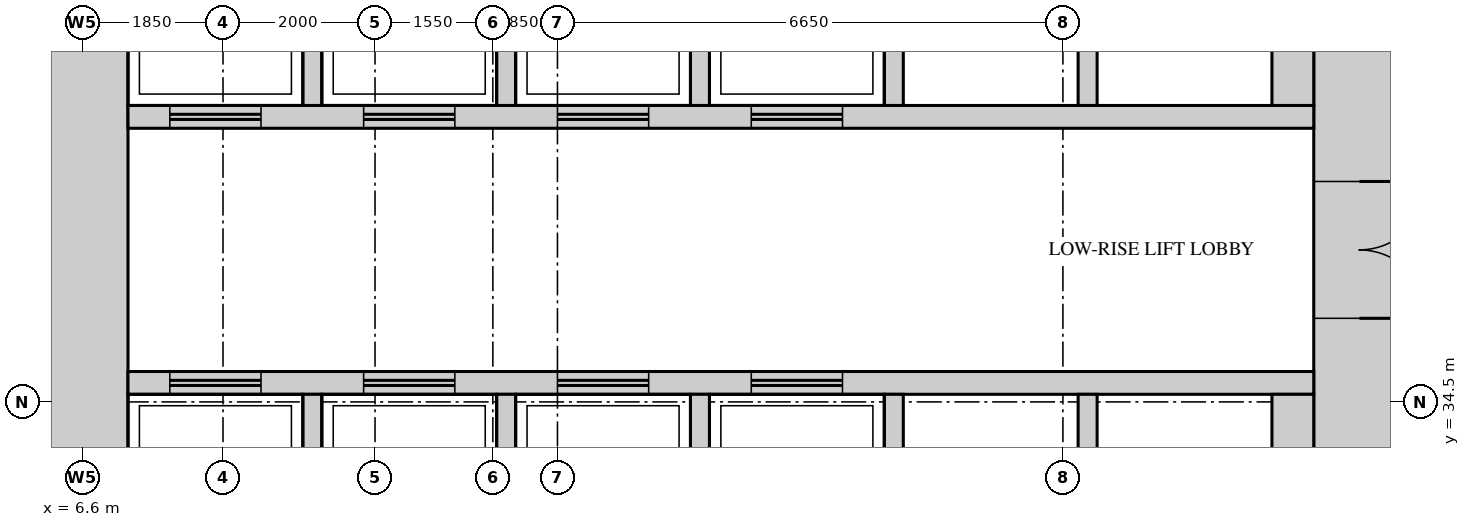
"""IFC4 building model, lengths in metres.
Left out: names, types, materials, properties, quantities, classifications, styles, units other than length and angle.
Written with IfcOpenShell. Run it as: python <this file> out.ifc"""

import sys

from ifc_helpers import new_model, si_unit, direction, frame, frame_2d, origin, place, context, subcontext, project, spatial, rectangle, extrude, source, transform, mapped, element, fill, save


model = new_model("IFC4")
c1 = context("Model", 3, precision=1e-05, world=origin(), true_north=direction((0.0, 1.0)))
c2 = subcontext(c1, "Body", "Model", "MODEL_VIEW")
j1 = project(units=[si_unit("LENGTHUNIT", "METRE"), si_unit("PLANEANGLEUNIT", "RADIAN")], contexts=[c1])
p1 = place(None, origin())
s1 = spatial("IfcSite", under=j1, at=p1, CompositionType="ELEMENT")
p2 = place(p1, origin())
s2 = spatial("IfcBuilding", under=s1, at=p2, CompositionType="ELEMENT")
p3 = place(p2, frame((0.0, 0.0, 91.5)))
s3 = spatial("IfcBuildingStorey", under=s2, at=p3, CompositionType="ELEMENT", Elevation=91.5)
m1 = source(origin(), c2, "Body", "SweptSolid", [
    extrude(rectangle(XDim=27.6, YDim=1.2, at=frame_2d((13.8, 0.0))), origin(), (0.0, 0.0, 1.0), 4.2),
])
p4 = place(p3, frame((23.4, 13.2, 0.0), z_axis=(0.0, 0.0, 1.0), x_axis=(0.0, 1.0, 0.0)))
e1 = element("IfcWall", 1, at=p4, inside=s3, PredefinedType="SHEAR", context=c2, shape_type="MappedRepresentation", body=[
    mapped(m1, transform((0.0, 0.0, 0.0))),
])
m2 = source(origin(), c2, "Body", "SweptSolid", [
    extrude(rectangle(XDim=1.8, YDim=2.1, at=frame_2d((0.9, 1.05))), frame((0.0, 0.61, 0.0), z_axis=(0.0, -1.0, 0.0), x_axis=(1.0, 0.0, 0.0)), (0.0, 0.0, 1.0), 1.22),
])
p5 = place(p4, frame((22.4, 0.0, 0.0)))
e2 = element("IfcOpeningElement", 2, at=p5, cuts=e1, PredefinedType="OPENING", context=c2, shape_type="MappedRepresentation", body=[
    mapped(m2, transform((0.0, 0.0, 0.0))),
])
m3 = source(origin(), c2, "Body", "SweptSolid", [
    extrude(rectangle(XDim=1.2, YDim=2.1, at=frame_2d((0.6, 1.05))), frame((0.0, 0.61, 0.0), z_axis=(0.0, -1.0, 0.0), x_axis=(1.0, 0.0, 0.0)), (0.0, 0.0, 1.0), 1.22),
])
p6 = place(p4, frame((12.9, 0.0, 0.0)))
e3 = element("IfcOpeningElement", 3, at=p6, cuts=e1, PredefinedType="OPENING", context=c2, shape_type="MappedRepresentation", body=[
    mapped(m3, transform((0.0, 0.0, 0.0))),
])
m4 = source(origin(), c2, "Body", "SweptSolid", [
    extrude(rectangle(XDim=0.9, YDim=2.1, at=frame_2d((0.45, 1.05))), frame((0.0, 0.61, 0.0), z_axis=(0.0, -1.0, 0.0), x_axis=(1.0, 0.0, 0.0)), (0.0, 0.0, 1.0), 1.22),
])
p7 = place(p4, frame((2.0, 0.0, 0.0)))
e4 = element("IfcOpeningElement", 4, at=p7, cuts=e1, PredefinedType="OPENING", context=c2, shape_type="MappedRepresentation", body=[
    mapped(m4, transform((0.0, 0.0, 0.0))),
])
p8 = place(p4, frame((6.85, 0.0, 0.0)))
e5 = element("IfcOpeningElement", 5, at=p8, cuts=e1, PredefinedType="OPENING", context=c2, shape_type="MappedRepresentation", body=[
    mapped(m4, transform((0.0, 0.0, 0.0))),
])
p9 = place(p3, frame((6.6, 13.2, 0.0), z_axis=(0.0, 0.0, 1.0), x_axis=(0.0, 1.0, 0.0)))
e6 = element("IfcWall", 6, at=p9, inside=s3, PredefinedType="SHEAR", context=c2, shape_type="MappedRepresentation", body=[
    mapped(m1, transform((0.0, 0.0, 0.0))),
])
m5 = source(origin(), c2, "Body", "SweptSolid", [
    extrude(rectangle(XDim=15.6, YDim=0.3, at=frame_2d((7.8, 0.0))), origin(), (0.0, 0.0, 1.0), 4.2),
])
p10 = place(p3, frame((7.2, 38.25, 0.0), z_axis=(0.0, 0.0, 1.0), x_axis=(1.0, 0.0, 0.0)))
e7 = element("IfcWall", 7, at=p10, inside=s3, PredefinedType="STANDARD", context=c2, shape_type="MappedRepresentation", body=[
    mapped(m5, transform((0.0, 0.0, 0.0))),
])
m6 = source(origin(), c2, "Body", "SweptSolid", [
    extrude(rectangle(XDim=1.2, YDim=2.1, at=frame_2d((0.6, 1.05))), frame((0.0, 0.16, 0.0), z_axis=(0.0, -1.0, 0.0), x_axis=(1.0, 0.0, 0.0)), (0.0, 0.0, 1.0), 0.32),
])
p11 = place(p10, frame((0.55, 0.0, 0.0)))
e8 = element("IfcOpeningElement", 8, at=p11, cuts=e7, PredefinedType="OPENING", context=c2, shape_type="MappedRepresentation", body=[
    mapped(m6, transform((0.0, 0.0, 0.0))),
])
p12 = place(p10, frame((3.1, 0.0, 0.0)))
e9 = element("IfcOpeningElement", 9, at=p12, cuts=e7, PredefinedType="OPENING", context=c2, shape_type="MappedRepresentation", body=[
    mapped(m6, transform((0.0, 0.0, 0.0))),
])
p13 = place(p10, frame((5.65, 0.0, 0.0)))
e10 = element("IfcOpeningElement", 10, at=p13, cuts=e7, PredefinedType="OPENING", context=c2, shape_type="MappedRepresentation", body=[
    mapped(m6, transform((0.0, 0.0, 0.0))),
])
p14 = place(p10, frame((8.2, 0.0, 0.0)))
e11 = element("IfcOpeningElement", 11, at=p14, cuts=e7, PredefinedType="OPENING", context=c2, shape_type="MappedRepresentation", body=[
    mapped(m6, transform((0.0, 0.0, 0.0))),
])
p15 = place(p3, frame((7.2, 34.75, 0.0), z_axis=(0.0, 0.0, 1.0), x_axis=(1.0, 0.0, 0.0)))
e12 = element("IfcWall", 12, at=p15, inside=s3, PredefinedType="STANDARD", context=c2, shape_type="MappedRepresentation", body=[
    mapped(m5, transform((0.0, 0.0, 0.0))),
])
p16 = place(p15, frame((0.55, 0.0, 0.0)))
e13 = element("IfcOpeningElement", 13, at=p16, cuts=e12, PredefinedType="OPENING", context=c2, shape_type="MappedRepresentation", body=[
    mapped(m6, transform((0.0, 0.0, 0.0))),
])
p17 = place(p15, frame((3.1, 0.0, 0.0)))
e14 = element("IfcOpeningElement", 14, at=p17, cuts=e12, PredefinedType="OPENING", context=c2, shape_type="MappedRepresentation", body=[
    mapped(m6, transform((0.0, 0.0, 0.0))),
])
p18 = place(p15, frame((5.65, 0.0, 0.0)))
e15 = element("IfcOpeningElement", 15, at=p18, cuts=e12, PredefinedType="OPENING", context=c2, shape_type="MappedRepresentation", body=[
    mapped(m6, transform((0.0, 0.0, 0.0))),
])
p19 = place(p15, frame((8.2, 0.0, 0.0)))
e16 = element("IfcOpeningElement", 16, at=p19, cuts=e12, PredefinedType="OPENING", context=c2, shape_type="MappedRepresentation", body=[
    mapped(m6, transform((0.0, 0.0, 0.0))),
])
m7 = source(origin(), c2, "Body", "SweptSolid", [
    extrude(rectangle(XDim=2.4, YDim=0.25, at=frame_2d((1.2, 0.0))), origin(), (0.0, 0.0, 1.0), 4.2),
])
for number, where, z_axis, x_axis in (
    (17, (9.625, 38.4, 0.0), (0.0, 0.0, 1.0), (0.0, 1.0, 0.0)),
    (18, (12.175, 38.4, 0.0), (0.0, 0.0, 1.0), (0.0, 1.0, 0.0)),
    (19, (14.725, 38.4, 0.0), (0.0, 0.0, 1.0), (0.0, 1.0, 0.0)),
    (20, (17.275, 38.4, 0.0), (0.0, 0.0, 1.0), (0.0, 1.0, 0.0)),
    (21, (19.825, 38.4, 0.0), (0.0, 0.0, 1.0), (0.0, 1.0, 0.0)),
):
    element("IfcWall", number, at=place(p3, frame(where, z_axis=z_axis, x_axis=x_axis)), inside=s3, PredefinedType="STANDARD", context=c2, shape_type="MappedRepresentation", body=[
        mapped(m7, transform((0.0, 0.0, 0.0))),
    ])
m8 = source(origin(), c2, "Body", "SweptSolid", [
    extrude(rectangle(XDim=2.4, YDim=0.55, at=frame_2d((1.2, 0.0))), origin(), (0.0, 0.0, 1.0), 4.2),
])
p20 = place(p3, frame((22.525, 38.4, 0.0), z_axis=(0.0, 0.0, 1.0), x_axis=(0.0, 1.0, 0.0)))
e22 = element("IfcWall", 22, at=p20, inside=s3, PredefinedType="STANDARD", context=c2, shape_type="MappedRepresentation", body=[
    mapped(m8, transform((0.0, 0.0, 0.0))),
])
for number, where, z_axis, x_axis in (
    (23, (9.625, 32.2, 0.0), (0.0, 0.0, 1.0), (0.0, 1.0, 0.0)),
    (24, (12.175, 32.2, 0.0), (0.0, 0.0, 1.0), (0.0, 1.0, 0.0)),
    (25, (14.725, 32.2, 0.0), (0.0, 0.0, 1.0), (0.0, 1.0, 0.0)),
    (26, (17.275, 32.2, 0.0), (0.0, 0.0, 1.0), (0.0, 1.0, 0.0)),
    (27, (19.825, 32.2, 0.0), (0.0, 0.0, 1.0), (0.0, 1.0, 0.0)),
):
    element("IfcWall", number, at=place(p3, frame(where, z_axis=z_axis, x_axis=x_axis)), inside=s3, PredefinedType="STANDARD", context=c2, shape_type="MappedRepresentation", body=[
        mapped(m7, transform((0.0, 0.0, 0.0))),
    ])
p21 = place(p3, frame((22.525, 32.2, 0.0), z_axis=(0.0, 0.0, 1.0), x_axis=(0.0, 1.0, 0.0)))
e28 = element("IfcWall", 28, at=p21, inside=s3, PredefinedType="STANDARD", context=c2, shape_type="MappedRepresentation", body=[
    mapped(m8, transform((0.0, 0.0, 0.0))),
])
m9 = source(origin(), c2, "Body", "SweptSolid", [
    extrude(rectangle(XDim=1.8, YDim=2.1, at=frame_2d((0.9, 1.05))), frame((0.0, 0.55, 0.0), z_axis=(0.0, -1.0, 0.0), x_axis=(1.0, 0.0, 0.0)), (0.0, 0.0, 1.0), 1.1),
])
p22 = place(p5, origin())
e29 = element("IfcDoor", 29, at=p22, inside=s3, OperationType="DOUBLE_DOOR_SINGLE_SWING", PredefinedType="DOOR", context=c2, shape_type="MappedRepresentation", body=[
    mapped(m9, transform((0.0, 0.0, 0.0))),
])
fill(e2, e29)
m10 = source(origin(), c2, "Body", "SweptSolid", [
    extrude(rectangle(XDim=1.2, YDim=2.1, at=frame_2d((0.6, 1.05))), frame((0.0, 0.025, 0.0), z_axis=(0.0, -1.0, 0.0), x_axis=(1.0, 0.0, 0.0)), (0.0, 0.0, 1.0), 0.05),
])
p23 = place(p16, origin())
e30 = element("IfcDoor", 30, at=p23, inside=s3, OperationType="DOUBLE_DOOR_SLIDING", PredefinedType="DOOR", context=c2, shape_type="MappedRepresentation", body=[
    mapped(m10, transform((0.0, 0.0, 0.0))),
])
fill(e13, e30)
p24 = place(p17, origin())
e31 = element("IfcDoor", 31, at=p24, inside=s3, OperationType="DOUBLE_DOOR_SLIDING", PredefinedType="DOOR", context=c2, shape_type="MappedRepresentation", body=[
    mapped(m10, transform((0.0, 0.0, 0.0))),
])
fill(e14, e31)
p25 = place(p18, origin())
e32 = element("IfcDoor", 32, at=p25, inside=s3, OperationType="DOUBLE_DOOR_SLIDING", PredefinedType="DOOR", context=c2, shape_type="MappedRepresentation", body=[
    mapped(m10, transform((0.0, 0.0, 0.0))),
])
fill(e15, e32)
p26 = place(p19, origin())
e33 = element("IfcDoor", 33, at=p26, inside=s3, OperationType="DOUBLE_DOOR_SLIDING", PredefinedType="DOOR", context=c2, shape_type="MappedRepresentation", body=[
    mapped(m10, transform((0.0, 0.0, 0.0))),
])
fill(e16, e33)
p27 = place(p11, origin())
e34 = element("IfcDoor", 34, at=p27, inside=s3, OperationType="DOUBLE_DOOR_SLIDING", PredefinedType="DOOR", context=c2, shape_type="MappedRepresentation", body=[
    mapped(m10, transform((0.0, 0.0, 0.0))),
])
fill(e8, e34)
p28 = place(p12, origin())
e35 = element("IfcDoor", 35, at=p28, inside=s3, OperationType="DOUBLE_DOOR_SLIDING", PredefinedType="DOOR", context=c2, shape_type="MappedRepresentation", body=[
    mapped(m10, transform((0.0, 0.0, 0.0))),
])
fill(e9, e35)
p29 = place(p13, origin())
e36 = element("IfcDoor", 36, at=p29, inside=s3, OperationType="DOUBLE_DOOR_SLIDING", PredefinedType="DOOR", context=c2, shape_type="MappedRepresentation", body=[
    mapped(m10, transform((0.0, 0.0, 0.0))),
])
fill(e10, e36)
p30 = place(p14, origin())
e37 = element("IfcDoor", 37, at=p30, inside=s3, OperationType="DOUBLE_DOOR_SLIDING", PredefinedType="DOOR", context=c2, shape_type="MappedRepresentation", body=[
    mapped(m10, transform((0.0, 0.0, 0.0))),
])
fill(e11, e37)
save(model, sys.argv[1])
